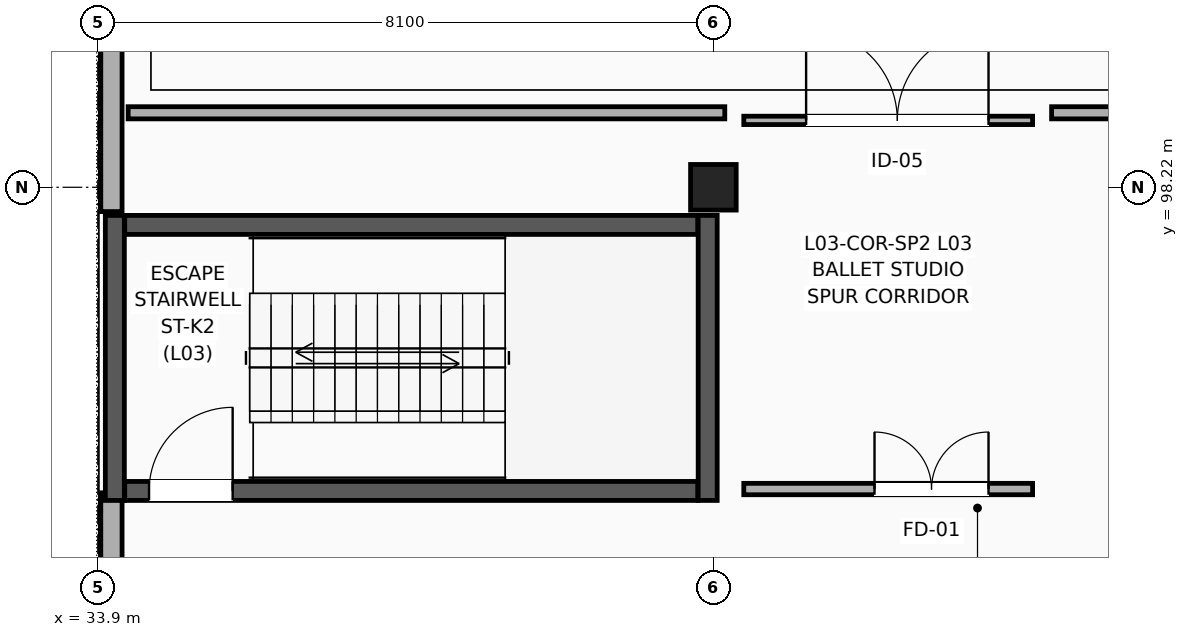
"""IFC4 building model, lengths in metres.
Left out: names, types, materials, properties, quantities, classifications, styles, units other than length and angle.
Written with IfcOpenShell. Run it as: python <this file> out.ifc"""

import sys

from ifc_helpers import new_model, si_unit, direction, frame, frame_2d, origin, origin_2d, place, context, subcontext, project, spatial, rectangle, extrude, element, fill, save


model = new_model("IFC4")
c1 = context("Model", 3, precision=1e-05, world=origin(), true_north=direction((0.0, 1.0)))
c2 = subcontext(c1, "Body", "Model", "MODEL_VIEW")
j1 = project(units=[si_unit("LENGTHUNIT", "METRE"), si_unit("PLANEANGLEUNIT", "RADIAN")], contexts=[c1])
p1 = place(None, origin())
s1 = spatial("IfcSite", under=j1, at=p1, CompositionType="ELEMENT")
p2 = place(p1, origin())
s2 = spatial("IfcBuilding", under=s1, at=p2, CompositionType="ELEMENT")
p3 = place(p2, frame((0.0, 0.0, 14.7)))
s3 = spatial("IfcBuildingStorey", under=s2, at=p3, CompositionType="ELEMENT", Elevation=14.7)
p4 = place(p3, frame((42.0, 98.22, 0.0), z_axis=(0.0, 0.0, 1.0), x_axis=(1.0, 0.0, 0.0)))
e1 = element("IfcColumn", 1, at=p4, inside=s3, PredefinedType="COLUMN", context=c2, shape_type="SweptSolid", body=[
    extrude(rectangle(XDim=0.6, YDim=0.6, at=origin_2d()), origin(), (0.0, 0.0, 1.0), 4.5),
])
p5 = place(p3, frame((34.08, 83.6, 0.0), z_axis=(0.0, 0.0, 1.0), x_axis=(0.0, 1.0, 0.0)))
e2 = element("IfcWall", 2, at=p5, inside=s3, PredefinedType="SOLIDWALL", context=c2, shape_type="SweptSolid", body=[
    extrude(rectangle(XDim=10.6, YDim=0.28, at=frame_2d((5.3, 0.0))), origin(), (0.0, 0.0, 1.0), 4.225),
])
p6 = place(p3, frame((34.08, 97.9, 0.0), z_axis=(0.0, 0.0, 1.0), x_axis=(0.0, 1.0, 0.0)))
e3 = element("IfcWall", 3, at=p6, inside=s3, PredefinedType="SOLIDWALL", context=c2, shape_type="SweptSolid", body=[
    extrude(rectangle(XDim=15.05, YDim=0.28, at=frame_2d((7.525, 0.0))), origin(), (0.0, 0.0, 1.0), 4.225),
])
p7 = place(p3, frame((34.255, 94.225, 0.0), z_axis=(0.0, 0.0, 1.0), x_axis=(1.0, 0.0, 0.0)))
e4 = element("IfcWall", 4, at=p7, inside=s3, PredefinedType="SHEAR", context=c2, shape_type="SweptSolid", body=[
    extrude(rectangle(XDim=7.54, YDim=0.25, at=frame_2d((3.77, 0.0))), origin(), (0.0, 0.0, 1.0), 4.245),
])
p8 = place(p7, frame((0.32, 0.0, 0.0)))
e5 = element("IfcOpeningElement", 5, at=p8, cuts=e4, PredefinedType="OPENING", context=c2, shape_type="SweptSolid", body=[
    extrude(rectangle(XDim=1.1, YDim=2.2, at=frame_2d((0.55, 1.1))), frame((0.0, 0.135, 0.0), z_axis=(0.0, -1.0, 0.0), x_axis=(1.0, 0.0, 0.0)), (0.0, 0.0, 1.0), 0.27),
])
p9 = place(p3, frame((34.255, 97.725, 0.0), z_axis=(0.0, 0.0, 1.0), x_axis=(1.0, 0.0, 0.0)))
e6 = element("IfcWall", 6, at=p9, inside=s3, PredefinedType="SHEAR", context=c2, shape_type="SweptSolid", body=[
    extrude(rectangle(XDim=7.54, YDim=0.25, at=frame_2d((3.77, 0.0))), origin(), (0.0, 0.0, 1.0), 4.245),
])
for number, where, z_axis, x_axis in (
    (7, (34.125, 94.1, 0.0), (0.0, 0.0, 1.0), (0.0, 1.0, 0.0)),
    (8, (41.925, 94.1, 0.0), (0.0, 0.0, 1.0), (0.0, 1.0, 0.0)),
):
    element("IfcWall", number, at=place(p3, frame(where, z_axis=z_axis, x_axis=x_axis)), inside=s3, PredefinedType="SHEAR", context=c2, shape_type="SweptSolid", body=[
        extrude(rectangle(XDim=3.75, YDim=0.25, at=frame_2d((1.875, 0.0))), origin(), (0.0, 0.0, 1.0), 4.245),
    ])
p10 = place(p3, frame((42.4, 94.25, 0.0), z_axis=(0.0, 0.0, 1.0), x_axis=(1.0, 0.0, 0.0)))
e9 = element("IfcWall", 9, at=p10, inside=s3, PredefinedType="MOVABLE", context=c2, shape_type="SweptSolid", body=[
    extrude(rectangle(XDim=3.8, YDim=0.15, at=frame_2d((1.9, 0.0))), origin(), (0.0, 0.0, 1.0), 3.777),
])
p11 = place(p10, frame((1.72, 0.0, 0.0)))
e10 = element("IfcOpeningElement", 10, at=p11, cuts=e9, PredefinedType="OPENING", context=c2, shape_type="SweptSolid", body=[
    extrude(rectangle(XDim=1.5, YDim=2.2, at=frame_2d((0.75, 1.1))), frame((0.0, 0.085, 0.0), z_axis=(0.0, -1.0, 0.0), x_axis=(1.0, 0.0, 0.0)), (0.0, 0.0, 1.0), 0.17),
])
p12 = place(p3, frame((42.4, 99.1, 0.0), z_axis=(0.0, 0.0, 1.0), x_axis=(1.0, 0.0, 0.0)))
e11 = element("IfcWall", 11, at=p12, inside=s3, PredefinedType="PARTITIONING", context=c2, shape_type="SweptSolid", body=[
    extrude(rectangle(XDim=3.8, YDim=0.11, at=frame_2d((1.9, 0.0))), origin(), (0.0, 0.0, 1.0), 3.957),
])
p13 = place(p12, frame((0.82, 0.0, 0.0)))
e12 = element("IfcOpeningElement", 12, at=p13, cuts=e11, PredefinedType="OPENING", context=c2, shape_type="SweptSolid", body=[
    extrude(rectangle(XDim=2.4, YDim=2.8, at=frame_2d((1.2, 1.4))), frame((0.0, 0.065, 0.0), z_axis=(0.0, -1.0, 0.0), x_axis=(1.0, 0.0, 0.0)), (0.0, 0.0, 1.0), 0.13),
])
p14 = place(p3, frame((34.3, 99.2, 0.0), z_axis=(0.0, 0.0, 1.0), x_axis=(1.0, 0.0, 0.0)))
e13 = element("IfcWall", 13, at=p14, inside=s3, PredefinedType="PARTITIONING", context=c2, shape_type="SweptSolid", body=[
    extrude(rectangle(XDim=7.85, YDim=0.16, at=frame_2d((3.925, 0.0))), origin(), (0.0, 0.0, 1.0), 3.577),
])
p15 = place(p3, frame((46.45, 99.2, 0.0), z_axis=(0.0, 0.0, 1.0), x_axis=(1.0, 0.0, 0.0)))
e14 = element("IfcWall", 14, at=p15, inside=s3, PredefinedType="PARTITIONING", context=c2, shape_type="SweptSolid", body=[
    extrude(rectangle(XDim=10.1, YDim=0.16, at=frame_2d((5.05, 0.0))), origin(), (0.0, 0.0, 1.0), 3.577),
])
p16 = place(p8, origin())
e15 = element("IfcDoor", 15, at=p16, inside=s3, OperationType="SINGLE_SWING_RIGHT", PredefinedType="DOOR", context=c2, shape_type="SweptSolid", body=[
    extrude(rectangle(XDim=1.1, YDim=2.2, at=frame_2d((0.55, 1.1))), frame((0.0, 0.025, 0.0), z_axis=(0.0, -1.0, 0.0), x_axis=(1.0, 0.0, 0.0)), (0.0, 0.0, 1.0), 0.05),
])
fill(e5, e15)
p17 = place(p11, origin())
e16 = element("IfcDoor", 16, at=p17, inside=s3, OperationType="DOUBLE_DOOR_SINGLE_SWING", PredefinedType="DOOR", context=c2, shape_type="SweptSolid", body=[
    extrude(rectangle(XDim=1.5, YDim=2.2, at=frame_2d((0.75, 1.1))), frame((0.0, 0.025, 0.0), z_axis=(0.0, -1.0, 0.0), x_axis=(1.0, 0.0, 0.0)), (0.0, 0.0, 1.0), 0.05),
])
fill(e10, e16)
p18 = place(p13, origin())
e17 = element("IfcDoor", 17, at=p18, inside=s3, OperationType="DOUBLE_DOOR_SINGLE_SWING", PredefinedType="DOOR", context=c2, shape_type="SweptSolid", body=[
    extrude(rectangle(XDim=2.4, YDim=2.8, at=frame_2d((1.2, 1.4))), frame((0.0, 0.025, 0.0), z_axis=(0.0, -1.0, 0.0), x_axis=(1.0, 0.0, 0.0)), (0.0, 0.0, 1.0), 0.05),
])
fill(e12, e17)
save(model, sys.argv[1])
